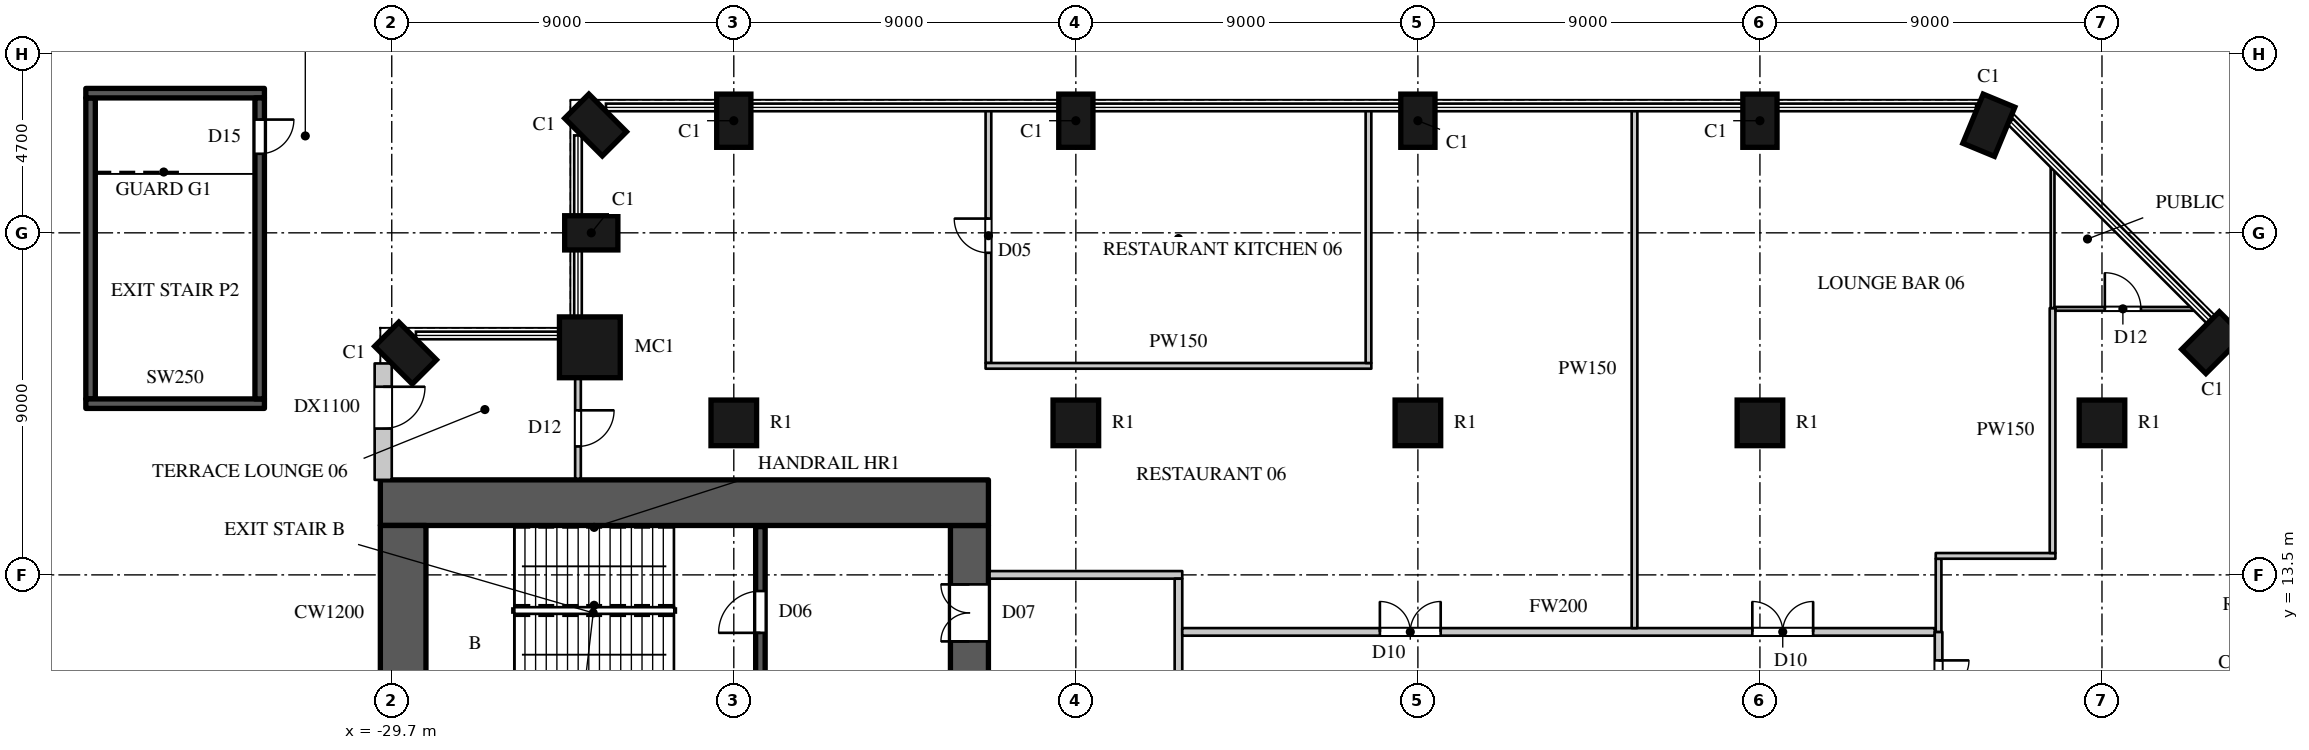
"""IFC4 building model, lengths in metres.
Left out: names, types, materials, properties, quantities, classifications, styles, units other than length and angle.
Written with IfcOpenShell. Run it as: python <this file> out.ifc"""

import sys

from ifc_helpers import new_model, si_unit, direction, frame, frame_2d, origin, origin_2d, place, context, subcontext, project, spatial, rectangle, circle, extrude, element, fill, save


model = new_model("IFC4")
c1 = context("Model", 3, precision=1e-05, world=origin(), true_north=direction((0.0, 1.0)))
c2 = subcontext(c1, "Body", "Model", "MODEL_VIEW")
j1 = project(units=[si_unit("LENGTHUNIT", "METRE"), si_unit("PLANEANGLEUNIT", "RADIAN")], contexts=[c1])
p1 = place(None, origin())
s1 = spatial("IfcSite", under=j1, at=p1, CompositionType="ELEMENT")
p2 = place(p1, origin())
s2 = spatial("IfcBuilding", under=s1, at=p2, CompositionType="ELEMENT")
p3 = place(p2, frame((0.0, 0.0, 50.0)))
s3 = spatial("IfcBuildingStorey", under=s2, at=p3, CompositionType="ELEMENT", Elevation=50.0)
for number, where, z_axis, x_axis in (
    (1, (-29.337, 19.337, 0.0), (0.0, 0.0, 1.0), (-0.707, -0.707, 0.0)),
    (2, (18.211, 19.611, 0.0), (0.0, 0.0, 1.0), (-0.707, 0.707, 0.0)),
    (3, (12.323, 25.331, 0.0), (0.0, 0.0, 1.0), (-0.924, 0.383, 0.0)),
    (4, (6.3, 25.45, 0.0), (0.0, 0.0, 1.0), (-1.0, 0.0, 0.0)),
    (5, (-2.7, 25.45, 0.0), (0.0, 0.0, 1.0), (-1.0, 0.0, 0.0)),
    (6, (-11.7, 25.45, 0.0), (0.0, 0.0, 1.0), (-1.0, 0.0, 0.0)),
    (7, (-20.7, 25.45, 0.0), (0.0, 0.0, 1.0), (-1.0, 0.0, 0.0)),
    (8, (-24.337, 25.337, 0.0), (0.0, 0.0, 1.0), (-0.707, -0.707, 0.0)),
    (9, (-24.45, 22.5, 0.0), (0.0, 0.0, 1.0), (0.0, -1.0, 0.0)),
):
    element("IfcColumn", number, at=place(p3, frame(where, z_axis=z_axis, x_axis=x_axis)), inside=s3, PredefinedType="COLUMN", context=c2, shape_type="SweptSolid", body=[
        extrude(rectangle(XDim=0.9, YDim=1.4, at=origin_2d()), origin(), (0.0, 0.0, 1.0), 5.5),
    ])
p4 = place(p3, frame((-24.488, 19.488, 0.0), z_axis=(0.0, 0.0, 1.0), x_axis=(1.0, 0.0, 0.0)))
e10 = element("IfcColumn", 10, at=p4, inside=s3, PredefinedType="COLUMN", context=c2, shape_type="SweptSolid", body=[
    extrude(circle(Radius=0.8, at=origin_2d()), origin(), (0.0, 0.0, 1.0), 5.5),
])
for number, where, z_axis, x_axis in (
    (11, (-20.7, 17.5, 0.0), (0.0, 0.0, 1.0), (1.0, 0.0, 0.0)),
    (12, (-11.7, 17.5, 0.0), (0.0, 0.0, 1.0), (1.0, 0.0, 0.0)),
    (13, (-2.7, 17.5, 0.0), (0.0, 0.0, 1.0), (1.0, 0.0, 0.0)),
    (14, (6.3, 17.5, 0.0), (0.0, 0.0, 1.0), (1.0, 0.0, 0.0)),
    (15, (15.3, 17.5, 0.0), (0.0, 0.0, 1.0), (1.0, 0.0, 0.0)),
):
    element("IfcColumn", number, at=place(p3, frame(where, z_axis=z_axis, x_axis=x_axis)), inside=s3, PredefinedType="COLUMN", context=c2, shape_type="SweptSolid", body=[
        extrude(circle(Radius=0.6, at=origin_2d()), origin(), (0.0, 0.0, 1.0), 5.5),
    ])
p5 = place(p3, frame((-29.925, 19.064, 0.0), z_axis=(0.0, 0.0, 1.0), x_axis=(0.0, -1.0, 0.0)))
e16 = element("IfcWall", 16, at=p5, inside=s3, PredefinedType="SOLIDWALL", context=c2, shape_type="SweptSolid", body=[
    extrude(rectangle(XDim=3.064, YDim=0.45, at=frame_2d((1.532, 0.0))), origin(), (0.0, 0.0, 1.0), 5.2),
])
p6 = place(p5, frame((0.614, 0.0, 0.0)))
e17 = element("IfcOpeningElement", 17, at=p6, cuts=e16, PredefinedType="OPENING", context=c2, shape_type="SweptSolid", body=[
    extrude(rectangle(XDim=1.1, YDim=2.4, at=frame_2d((0.55, 1.2))), frame((0.0, 0.235, 0.0), z_axis=(0.0, -1.0, 0.0), x_axis=(1.0, 0.0, 0.0)), (0.0, 0.0, 1.0), 0.47),
])
p7 = place(p3, frame((-30.0, 15.4, 0.0), z_axis=(0.0, 0.0, 1.0), x_axis=(1.0, 0.0, 0.0)))
e18 = element("IfcWall", 18, at=p7, inside=s3, PredefinedType="SHEAR", context=c2, shape_type="SweptSolid", body=[
    extrude(rectangle(XDim=16.0, YDim=1.2, at=frame_2d((8.0, 0.0))), origin(), (0.0, 0.0, 1.0), 5.5),
])
p8 = place(p3, frame((-14.5, -14.8, 0.0), z_axis=(0.0, 0.0, 1.0), x_axis=(0.0, 1.0, 0.0)))
e19 = element("IfcWall", 19, at=p8, inside=s3, PredefinedType="SHEAR", context=c2, shape_type="SweptSolid", body=[
    extrude(rectangle(XDim=29.6, YDim=1.0, at=frame_2d((14.8, 0.0))), origin(), (0.0, 0.0, 1.0), 5.5),
])
p9 = place(p8, frame((1.55, 0.0, 0.0)))
e20 = element("IfcOpeningElement", 20, at=p9, cuts=e19, PredefinedType="OPENING", context=c2, shape_type="SweptSolid", body=[
    extrude(rectangle(XDim=1.5, YDim=2.4, at=frame_2d((0.75, 1.2))), frame((0.0, 0.51, 0.0), z_axis=(0.0, -1.0, 0.0), x_axis=(1.0, 0.0, 0.0)), (0.0, 0.0, 1.0), 1.02),
])
p10 = place(p8, frame((26.55, 0.0, 0.0)))
e21 = element("IfcOpeningElement", 21, at=p10, cuts=e19, PredefinedType="OPENING", context=c2, shape_type="SweptSolid", body=[
    extrude(rectangle(XDim=1.5, YDim=2.4, at=frame_2d((0.75, 1.2))), frame((0.0, 0.51, 0.0), z_axis=(0.0, -1.0, 0.0), x_axis=(1.0, 0.0, 0.0)), (0.0, 0.0, 1.0), 1.02),
])
p11 = place(p8, frame((8.45, 0.0, 0.0)))
e22 = element("IfcOpeningElement", 22, at=p11, cuts=e19, PredefinedType="OPENING", context=c2, shape_type="SweptSolid", body=[
    extrude(rectangle(XDim=1.5, YDim=2.4, at=frame_2d((0.75, 1.2))), frame((0.0, 0.51, 0.0), z_axis=(0.0, -1.0, 0.0), x_axis=(1.0, 0.0, 0.0)), (0.0, 0.0, 1.0), 1.02),
])
p12 = place(p8, frame((19.65, 0.0, 0.0)))
e23 = element("IfcOpeningElement", 23, at=p12, cuts=e19, PredefinedType="OPENING", context=c2, shape_type="SweptSolid", body=[
    extrude(rectangle(XDim=1.5, YDim=2.4, at=frame_2d((0.75, 1.2))), frame((0.0, 0.51, 0.0), z_axis=(0.0, -1.0, 0.0), x_axis=(1.0, 0.0, 0.0)), (0.0, 0.0, 1.0), 1.02),
])
p13 = place(p8, frame((14.5, 0.0, 0.0)))
e24 = element("IfcOpeningElement", 24, at=p13, cuts=e19, PredefinedType="OPENING", context=c2, shape_type="SweptSolid", body=[
    extrude(rectangle(XDim=0.6, YDim=2.0, at=frame_2d((0.3, 1.0))), frame((0.0, 0.51, 0.0), z_axis=(0.0, -1.0, 0.0), x_axis=(1.0, 0.0, 0.0)), (0.0, 0.0, 1.0), 1.02),
])
p14 = place(p3, frame((-29.4, 10.2, 0.0), z_axis=(0.0, 0.0, 1.0), x_axis=(0.0, 1.0, 0.0)))
e25 = element("IfcWall", 25, at=p14, inside=s3, PredefinedType="SHEAR", context=c2, shape_type="SweptSolid", body=[
    extrude(rectangle(XDim=4.6, YDim=1.2, at=frame_2d((2.3, 0.0))), origin(), (0.0, 0.0, 1.0), 5.5),
])
p15 = place(p3, frame((-13.97, 13.5, 0.0), z_axis=(0.0, 0.0, 1.0), x_axis=(1.0, 0.0, 0.0)))
e26 = element("IfcWall", 26, at=p15, inside=s3, PredefinedType="PARTITIONING", context=c2, shape_type="SweptSolid", body=[
    extrude(rectangle(XDim=5.07, YDim=0.2, at=frame_2d((2.535, 0.0))), origin(), (0.0, 0.0, 1.0), 5.2),
])
p16 = place(p3, frame((-9.0, -13.4, 0.0), z_axis=(0.0, 0.0, 1.0), x_axis=(0.0, 1.0, 0.0)))
e27 = element("IfcWall", 27, at=p16, inside=s3, PredefinedType="PARTITIONING", context=c2, shape_type="SweptSolid", body=[
    extrude(rectangle(XDim=26.8, YDim=0.2, at=frame_2d((13.4, 0.0))), origin(), (0.0, 0.0, 1.0), 5.2),
])
p17 = place(p16, frame((12.6, 0.0, 0.0)))
e28 = element("IfcOpeningElement", 28, at=p17, cuts=e27, PredefinedType="OPENING", context=c2, shape_type="SweptSolid", body=[
    extrude(rectangle(XDim=1.6, YDim=2.4, at=frame_2d((0.8, 1.2))), frame((0.0, 0.11, 0.0), z_axis=(0.0, -1.0, 0.0), x_axis=(1.0, 0.0, 0.0)), (0.0, 0.0, 1.0), 0.22),
])
p18 = place(p3, frame((-8.9, 12.0, 0.0), z_axis=(0.0, 0.0, 1.0), x_axis=(1.0, 0.0, 0.0)))
e29 = element("IfcWall", 29, at=p18, inside=s3, PredefinedType="PARTITIONING", context=c2, shape_type="SweptSolid", body=[
    extrude(rectangle(XDim=19.8, YDim=0.2, at=frame_2d((9.9, 0.0))), origin(), (0.0, 0.0, 1.0), 5.2),
])
p19 = place(p18, frame((5.2, 0.0, 0.0)))
e30 = element("IfcOpeningElement", 30, at=p19, cuts=e29, PredefinedType="OPENING", context=c2, shape_type="SweptSolid", body=[
    extrude(rectangle(XDim=1.6, YDim=2.4, at=frame_2d((0.8, 1.2))), frame((0.0, 0.11, 0.0), z_axis=(0.0, -1.0, 0.0), x_axis=(1.0, 0.0, 0.0)), (0.0, 0.0, 1.0), 0.22),
])
p20 = place(p18, frame((15.0, 0.0, 0.0)))
e31 = element("IfcOpeningElement", 31, at=p20, cuts=e29, PredefinedType="OPENING", context=c2, shape_type="SweptSolid", body=[
    extrude(rectangle(XDim=1.6, YDim=2.4, at=frame_2d((0.8, 1.2))), frame((0.0, 0.11, 0.0), z_axis=(0.0, -1.0, 0.0), x_axis=(1.0, 0.0, 0.0)), (0.0, 0.0, 1.0), 0.22),
])
p21 = place(p3, frame((11.0, -11.9, 0.0), z_axis=(0.0, 0.0, 1.0), x_axis=(0.0, 1.0, 0.0)))
e32 = element("IfcWall", 32, at=p21, inside=s3, PredefinedType="PARTITIONING", context=c2, shape_type="SweptSolid", body=[
    extrude(rectangle(XDim=23.9, YDim=0.2, at=frame_2d((11.95, 0.0))), origin(), (0.0, 0.0, 1.0), 5.2),
])
p22 = place(p21, frame((21.55, 0.0, 0.0)))
e33 = element("IfcOpeningElement", 33, at=p22, cuts=e32, PredefinedType="OPENING", context=c2, shape_type="SweptSolid", body=[
    extrude(rectangle(XDim=1.6, YDim=2.4, at=frame_2d((0.8, 1.2))), frame((0.0, 0.11, 0.0), z_axis=(0.0, -1.0, 0.0), x_axis=(1.0, 0.0, 0.0)), (0.0, 0.0, 1.0), 0.22),
])
p23 = place(p21, frame((11.1, 0.0, 0.0)))
e34 = element("IfcOpeningElement", 34, at=p23, cuts=e32, PredefinedType="OPENING", context=c2, shape_type="SweptSolid", body=[
    extrude(rectangle(XDim=1.6, YDim=2.4, at=frame_2d((0.8, 1.2))), frame((0.0, 0.11, 0.0), z_axis=(0.0, -1.0, 0.0), x_axis=(1.0, 0.0, 0.0)), (0.0, 0.0, 1.0), 0.22),
])
p24 = place(p3, frame((-24.8, 16.03, 0.0), z_axis=(0.0, 0.0, 1.0), x_axis=(0.0, 1.0, 0.0)))
e35 = element("IfcWall", 35, at=p24, inside=s3, PredefinedType="PARTITIONING", context=c2, shape_type="SweptSolid", body=[
    extrude(rectangle(XDim=2.702, YDim=0.15, at=frame_2d((1.351, 0.0))), origin(), (0.0, 0.0, 1.0), 5.2),
])
p25 = place(p24, frame((0.85, 0.0, 0.0)))
e36 = element("IfcOpeningElement", 36, at=p25, cuts=e35, PredefinedType="OPENING", context=c2, shape_type="SweptSolid", body=[
    extrude(rectangle(XDim=0.95, YDim=2.2, at=frame_2d((0.475, 1.1))), frame((0.0, 0.085, 0.0), z_axis=(0.0, -1.0, 0.0), x_axis=(1.0, 0.0, 0.0)), (0.0, 0.0, 1.0), 0.17),
])
p26 = place(p3, frame((-14.0, 19.075, 0.0), z_axis=(0.0, 0.0, 1.0), x_axis=(0.0, 1.0, 0.0)))
e37 = element("IfcWall", 37, at=p26, inside=s3, PredefinedType="PARTITIONING", context=c2, shape_type="SweptSolid", body=[
    extrude(rectangle(XDim=6.68, YDim=0.15, at=frame_2d((3.34, 0.0))), origin(), (0.0, 0.0, 1.0), 5.2),
])
p27 = place(p26, frame((2.9, 0.0, 0.0)))
e38 = element("IfcOpeningElement", 38, at=p27, cuts=e37, PredefinedType="OPENING", context=c2, shape_type="SweptSolid", body=[
    extrude(rectangle(XDim=0.9, YDim=2.2, at=frame_2d((0.45, 1.1))), frame((0.0, 0.085, 0.0), z_axis=(0.0, -1.0, 0.0), x_axis=(1.0, 0.0, 0.0)), (0.0, 0.0, 1.0), 0.17),
])
p28 = place(p3, frame((-14.075, 19.0, 0.0), z_axis=(0.0, 0.0, 1.0), x_axis=(1.0, 0.0, 0.0)))
e39 = element("IfcWall", 39, at=p28, inside=s3, PredefinedType="PARTITIONING", context=c2, shape_type="SweptSolid", body=[
    extrude(rectangle(XDim=10.15, YDim=0.15, at=frame_2d((5.075, 0.0))), origin(), (0.0, 0.0, 1.0), 5.2),
])
p29 = place(p3, frame((-4.0, 19.075, 0.0), z_axis=(0.0, 0.0, 1.0), x_axis=(0.0, 1.0, 0.0)))
e40 = element("IfcWall", 40, at=p29, inside=s3, PredefinedType="PARTITIONING", context=c2, shape_type="SweptSolid", body=[
    extrude(rectangle(XDim=6.65, YDim=0.15, at=frame_2d((3.325, 0.0))), origin(), (0.0, 0.0, 1.0), 5.2),
])
p30 = place(p3, frame((3.0, 12.1, 0.0), z_axis=(0.0, 0.0, 1.0), x_axis=(0.0, 1.0, 0.0)))
e41 = element("IfcWall", 41, at=p30, inside=s3, PredefinedType="PARTITIONING", context=c2, shape_type="SweptSolid", body=[
    extrude(rectangle(XDim=13.625, YDim=0.15, at=frame_2d((6.812, 0.0))), origin(), (0.0, 0.0, 1.0), 5.2),
])
p31 = place(p3, frame((11.0, 12.0, 0.0), z_axis=(0.0, 0.0, 1.0), x_axis=(0.0, 1.0, 0.0)))
e42 = element("IfcWall", 42, at=p31, inside=s3, PredefinedType="PARTITIONING", context=c2, shape_type="SweptSolid", body=[
    extrude(rectangle(XDim=1.924, YDim=0.15, at=frame_2d((0.962, 0.0))), origin(), (0.0, 0.0, 1.0), 5.2),
])
p32 = place(p3, frame((10.926, 14.0, 0.0), z_axis=(0.0, 0.0, 1.0), x_axis=(1.0, 0.0, 0.0)))
e43 = element("IfcWall", 43, at=p32, inside=s3, PredefinedType="PARTITIONING", context=c2, shape_type="SweptSolid", body=[
    extrude(rectangle(XDim=3.149, YDim=0.15, at=frame_2d((1.574, 0.0))), origin(), (0.0, 0.0, 1.0), 5.2),
])
p33 = place(p3, frame((14.0, 14.075, 0.0), z_axis=(0.0, 0.0, 1.0), x_axis=(0.0, 1.0, 0.0)))
e44 = element("IfcWall", 44, at=p33, inside=s3, PredefinedType="PARTITIONING", context=c2, shape_type="SweptSolid", body=[
    extrude(rectangle(XDim=6.445, YDim=0.15, at=frame_2d((3.223, 0.0))), origin(), (0.0, 0.0, 1.0), 5.2),
])
p34 = place(p3, frame((-37.625, 18.13, 0.0), z_axis=(0.0, 0.0, 1.0), x_axis=(0.0, 1.0, 0.0)))
e45 = element("IfcWall", 45, at=p34, inside=s3, PredefinedType="SHEAR", context=c2, shape_type="SweptSolid", body=[
    extrude(rectangle(XDim=7.92, YDim=0.25, at=frame_2d((3.96, 0.0))), origin(), (0.0, 0.0, 1.0), 4.1),
])
for number, where, z_axis, x_axis in (
    (46, (-37.75, 18.005, 0.0), (0.0, 0.0, 1.0), (1.0, 0.0, 0.0)),
    (47, (-37.75, 26.175, 0.0), (0.0, 0.0, 1.0), (1.0, 0.0, 0.0)),
):
    element("IfcWall", number, at=place(p3, frame(where, z_axis=z_axis, x_axis=x_axis)), inside=s3, PredefinedType="SHEAR", context=c2, shape_type="SweptSolid", body=[
        extrude(rectangle(XDim=4.7, YDim=0.25, at=frame_2d((2.35, 0.0))), origin(), (0.0, 0.0, 1.0), 4.1),
    ])
p35 = place(p3, frame((-33.175, 18.13, 0.0), z_axis=(0.0, 0.0, 1.0), x_axis=(0.0, 1.0, 0.0)))
e48 = element("IfcWall", 48, at=p35, inside=s3, PredefinedType="SHEAR", context=c2, shape_type="SweptSolid", body=[
    extrude(rectangle(XDim=7.92, YDim=0.25, at=frame_2d((3.96, 0.0))), origin(), (0.0, 0.0, 1.0), 4.1),
])
p36 = place(p35, frame((6.45, 0.0, 0.0)))
e49 = element("IfcOpeningElement", 49, at=p36, cuts=e48, PredefinedType="OPENING", context=c2, shape_type="SweptSolid", body=[
    extrude(rectangle(XDim=0.9, YDim=2.2, at=frame_2d((0.45, 1.1))), frame((0.0, 0.135, 0.0), z_axis=(0.0, -1.0, 0.0), x_axis=(1.0, 0.0, 0.0)), (0.0, 0.0, 1.0), 0.27),
])
p37 = place(p3, frame((-20.0, 10.325, 0.0), z_axis=(0.0, 0.0, 1.0), x_axis=(0.0, 1.0, 0.0)))
e50 = element("IfcWall", 50, at=p37, inside=s3, PredefinedType="SHEAR", context=c2, shape_type="SweptSolid", body=[
    extrude(rectangle(XDim=4.445, YDim=0.25, at=frame_2d((2.223, 0.0))), origin(), (0.0, 0.0, 1.0), 5.2),
])
p38 = place(p37, frame((1.65, 0.0, 0.0)))
e51 = element("IfcOpeningElement", 51, at=p38, cuts=e50, PredefinedType="OPENING", context=c2, shape_type="SweptSolid", body=[
    extrude(rectangle(XDim=1.1, YDim=2.2, at=frame_2d((0.55, 1.1))), frame((0.0, 0.135, 0.0), z_axis=(0.0, -1.0, 0.0), x_axis=(1.0, 0.0, 0.0)), (0.0, 0.0, 1.0), 0.27),
])
p39 = place(p3, frame((14.0, 20.52, 0.0), z_axis=(0.0, 0.0, 1.0), x_axis=(0.0, 1.0, 0.0)))
e52 = element("IfcWall", 52, at=p39, inside=s3, PredefinedType="PARTITIONING", context=c2, shape_type="SweptSolid", body=[
    extrude(rectangle(XDim=3.733, YDim=0.1, at=frame_2d((1.867, 0.0))), origin(), (0.0, 0.0, 1.0), 5.2),
])
p40 = place(p3, frame((14.075, 20.5, 0.0), z_axis=(0.0, 0.0, 1.0), x_axis=(1.0, 0.0, 0.0)))
e53 = element("IfcWall", 53, at=p40, inside=s3, PredefinedType="PARTITIONING", context=c2, shape_type="SweptSolid", body=[
    extrude(rectangle(XDim=3.678, YDim=0.1, at=frame_2d((1.839, 0.0))), origin(), (0.0, 0.0, 1.0), 5.2),
])
p41 = place(p40, frame((1.3, 0.0, 0.0)))
e54 = element("IfcOpeningElement", 54, at=p41, cuts=e53, PredefinedType="OPENING", context=c2, shape_type="SweptSolid", body=[
    extrude(rectangle(XDim=0.95, YDim=2.2, at=frame_2d((0.475, 1.1))), frame((0.0, 0.06, 0.0), z_axis=(0.0, -1.0, 0.0), x_axis=(1.0, 0.0, 0.0)), (0.0, 0.0, 1.0), 0.12),
])
p42 = place(p6, origin())
e55 = element("IfcDoor", 55, at=p42, inside=s3, OperationType="SINGLE_SWING_LEFT", PredefinedType="DOOR", context=c2, shape_type="SweptSolid", body=[
    extrude(rectangle(XDim=1.1, YDim=2.4, at=frame_2d((0.55, 1.2))), frame((0.0, 0.025, 0.0), z_axis=(0.0, -1.0, 0.0), x_axis=(1.0, 0.0, 0.0)), (0.0, 0.0, 1.0), 0.05),
])
fill(e17, e55)
p43 = place(p38, origin())
e56 = element("IfcDoor", 56, at=p43, inside=s3, OperationType="SINGLE_SWING_LEFT", PredefinedType="DOOR", context=c2, shape_type="SweptSolid", body=[
    extrude(rectangle(XDim=1.1, YDim=2.2, at=frame_2d((0.55, 1.1))), frame((0.0, 0.025, 0.0), z_axis=(0.0, -1.0, 0.0), x_axis=(1.0, 0.0, 0.0)), (0.0, 0.0, 1.0), 0.05),
])
fill(e51, e56)
p44 = place(p19, origin())
e57 = element("IfcDoor", 57, at=p44, inside=s3, OperationType="DOUBLE_DOOR_SINGLE_SWING", PredefinedType="DOOR", context=c2, shape_type="SweptSolid", body=[
    extrude(rectangle(XDim=1.6, YDim=2.4, at=frame_2d((0.8, 1.2))), frame((0.0, 0.025, 0.0), z_axis=(0.0, -1.0, 0.0), x_axis=(1.0, 0.0, 0.0)), (0.0, 0.0, 1.0), 0.05),
])
fill(e30, e57)
p45 = place(p20, origin())
e58 = element("IfcDoor", 58, at=p45, inside=s3, OperationType="DOUBLE_DOOR_SINGLE_SWING", PredefinedType="DOOR", context=c2, shape_type="SweptSolid", body=[
    extrude(rectangle(XDim=1.6, YDim=2.4, at=frame_2d((0.8, 1.2))), frame((0.0, 0.025, 0.0), z_axis=(0.0, -1.0, 0.0), x_axis=(1.0, 0.0, 0.0)), (0.0, 0.0, 1.0), 0.05),
])
fill(e31, e58)
p46 = place(p22, origin())
e59 = element("IfcDoor", 59, at=p46, inside=s3, OperationType="DOUBLE_DOOR_SINGLE_SWING", PredefinedType="DOOR", context=c2, shape_type="SweptSolid", body=[
    extrude(rectangle(XDim=1.6, YDim=2.4, at=frame_2d((0.8, 1.2))), frame((0.0, 0.025, 0.0), z_axis=(0.0, -1.0, 0.0), x_axis=(1.0, 0.0, 0.0)), (0.0, 0.0, 1.0), 0.05),
])
fill(e33, e59)
p47 = place(p27, origin())
e60 = element("IfcDoor", 60, at=p47, inside=s3, OperationType="SINGLE_SWING_RIGHT", PredefinedType="DOOR", context=c2, shape_type="SweptSolid", body=[
    extrude(rectangle(XDim=0.9, YDim=2.2, at=frame_2d((0.45, 1.1))), frame((0.0, 0.025, 0.0), z_axis=(0.0, -1.0, 0.0), x_axis=(1.0, 0.0, 0.0)), (0.0, 0.0, 1.0), 0.05),
])
fill(e38, e60)
p48 = place(p41, origin())
e61 = element("IfcDoor", 61, at=p48, inside=s3, OperationType="SINGLE_SWING_LEFT", PredefinedType="DOOR", context=c2, shape_type="SweptSolid", body=[
    extrude(rectangle(XDim=0.95, YDim=2.2, at=frame_2d((0.475, 1.1))), frame((0.0, 0.025, 0.0), z_axis=(0.0, -1.0, 0.0), x_axis=(1.0, 0.0, 0.0)), (0.0, 0.0, 1.0), 0.05),
])
fill(e54, e61)
p49 = place(p25, origin())
e62 = element("IfcDoor", 62, at=p49, inside=s3, OperationType="SINGLE_SWING_LEFT", PredefinedType="DOOR", context=c2, shape_type="SweptSolid", body=[
    extrude(rectangle(XDim=0.95, YDim=2.2, at=frame_2d((0.475, 1.1))), frame((0.0, 0.025, 0.0), z_axis=(0.0, -1.0, 0.0), x_axis=(1.0, 0.0, 0.0)), (0.0, 0.0, 1.0), 0.05),
])
fill(e36, e62)
p50 = place(p10, origin())
e63 = element("IfcDoor", 63, at=p50, inside=s3, OperationType="DOUBLE_DOOR_SINGLE_SWING", PredefinedType="DOOR", context=c2, shape_type="SweptSolid", body=[
    extrude(rectangle(XDim=1.5, YDim=2.4, at=frame_2d((0.75, 1.2))), frame((0.0, 0.495, 0.0), z_axis=(0.0, -1.0, 0.0), x_axis=(1.0, 0.0, 0.0)), (0.0, 0.0, 1.0), 0.05),
])
fill(e21, e63)
p51 = place(p36, origin())
e64 = element("IfcDoor", 64, at=p51, inside=s3, OperationType="SINGLE_SWING_LEFT", PredefinedType="DOOR", context=c2, shape_type="SweptSolid", body=[
    extrude(rectangle(XDim=0.9, YDim=2.2, at=frame_2d((0.45, 1.1))), frame((0.0, 0.025, 0.0), z_axis=(0.0, -1.0, 0.0), x_axis=(1.0, 0.0, 0.0)), (0.0, 0.0, 1.0), 0.05),
])
fill(e49, e64)
save(model, sys.argv[1])
